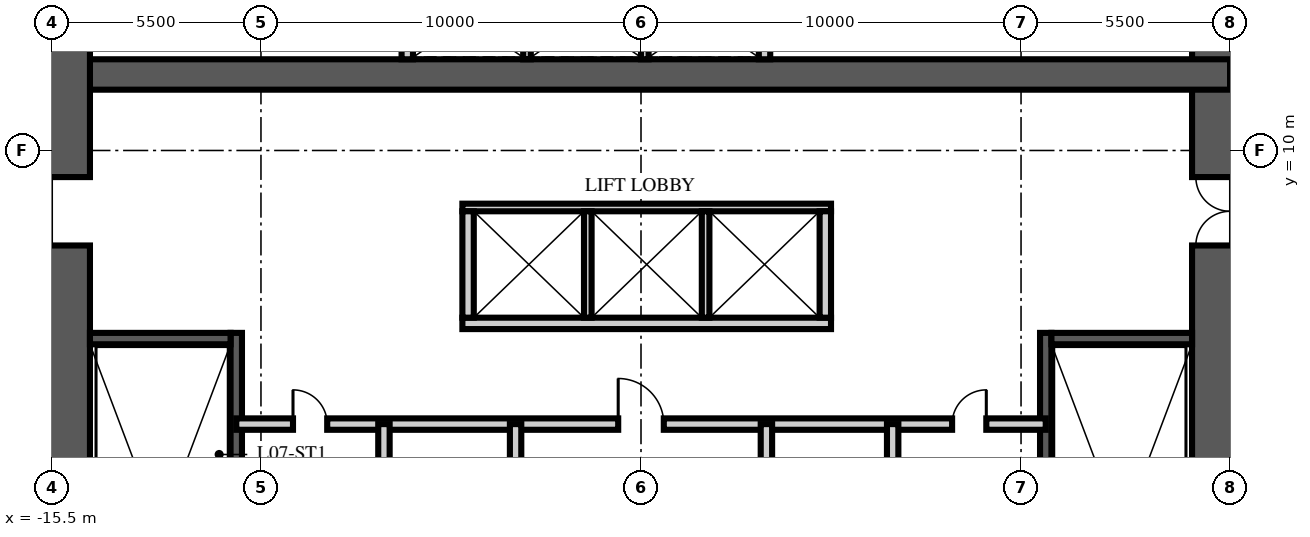
"""IFC4 building model, lengths in metres.
Left out: names, types, materials, properties, quantities, classifications, styles, units other than length and angle.
Written with IfcOpenShell. Run it as: python <this file> out.ifc"""

import sys

from ifc_helpers import new_model, si_unit, direction, frame, frame_2d, origin, place, context, subcontext, project, spatial, rectangle, extrude, element, fill, save


model = new_model("IFC4")
c1 = context("Model", 3, precision=1e-05, world=origin(), true_north=direction((0.0, 1.0)))
c2 = subcontext(c1, "Body", "Model", "MODEL_VIEW")
j1 = project(units=[si_unit("LENGTHUNIT", "METRE"), si_unit("PLANEANGLEUNIT", "RADIAN")], contexts=[c1])
p1 = place(None, origin())
s1 = spatial("IfcSite", under=j1, at=p1, CompositionType="ELEMENT")
p2 = place(p1, origin())
s2 = spatial("IfcBuilding", under=s1, at=p2, CompositionType="ELEMENT")
p3 = place(p2, frame((0.0, 0.0, 32.25)))
s3 = spatial("IfcBuildingStorey", under=s2, at=p3, CompositionType="ELEMENT", Elevation=32.25)
p4 = place(p3, frame((15.5, -15.5, -0.25), z_axis=(0.0, 0.0, 1.0), x_axis=(0.0, 1.0, 0.0)))
e1 = element("IfcWall", 1, at=p4, inside=s3, PredefinedType="SHEAR", context=c2, shape_type="SweptSolid", body=[
    extrude(rectangle(XDim=31.0, YDim=2.0, at=frame_2d((15.5, 0.0))), origin(), (0.0, 0.0, 1.0), 3.75),
])
p5 = place(p4, frame((6.5, 0.0, 0.25)))
e2 = element("IfcOpeningElement", 2, at=p5, cuts=e1, PredefinedType="OPENING", context=c2, shape_type="SweptSolid", body=[
    extrude(rectangle(XDim=1.2, YDim=2.1, at=frame_2d((0.6, 1.05))), frame((0.0, 1.01, 0.0), z_axis=(0.0, -1.0, 0.0), x_axis=(1.0, 0.0, 0.0)), (0.0, 0.0, 1.0), 2.02),
])
p6 = place(p4, frame((23.0, 0.0, 0.25)))
e3 = element("IfcOpeningElement", 3, at=p6, cuts=e1, PredefinedType="OPENING", context=c2, shape_type="SweptSolid", body=[
    extrude(rectangle(XDim=1.8, YDim=2.1, at=frame_2d((0.9, 1.05))), frame((0.0, 1.01, 0.0), z_axis=(0.0, -1.0, 0.0), x_axis=(1.0, 0.0, 0.0)), (0.0, 0.0, 1.0), 2.02),
])
p7 = place(p3, frame((-15.5, 12.0, -0.25), z_axis=(0.0, 0.0, 1.0), x_axis=(1.0, 0.0, 0.0)))
e4 = element("IfcWall", 4, at=p7, inside=s3, PredefinedType="SHEAR", context=c2, shape_type="SweptSolid", body=[
    extrude(rectangle(XDim=31.0, YDim=0.8, at=frame_2d((15.5, 0.0))), origin(), (0.0, 0.0, 1.0), 3.75),
])
p8 = place(p3, frame((-15.5, -15.5, -0.25), z_axis=(0.0, 0.0, 1.0), x_axis=(0.0, 1.0, 0.0)))
e5 = element("IfcWall", 5, at=p8, inside=s3, PredefinedType="SHEAR", context=c2, shape_type="SweptSolid", body=[
    extrude(rectangle(XDim=31.0, YDim=2.0, at=frame_2d((15.5, 0.0))), origin(), (0.0, 0.0, 1.0), 3.75),
])
p9 = place(p8, frame((6.5, 0.0, 0.25)))
e6 = element("IfcOpeningElement", 6, at=p9, cuts=e5, PredefinedType="OPENING", context=c2, shape_type="SweptSolid", body=[
    extrude(rectangle(XDim=1.2, YDim=2.1, at=frame_2d((0.6, 1.05))), frame((0.0, 1.01, 0.0), z_axis=(0.0, -1.0, 0.0), x_axis=(1.0, 0.0, 0.0)), (0.0, 0.0, 1.0), 2.02),
])
p10 = place(p8, frame((23.0, 0.0, 0.25)))
e7 = element("IfcOpeningElement", 7, at=p10, cuts=e5, PredefinedType="OPENING", context=c2, shape_type="SweptSolid", body=[
    extrude(rectangle(XDim=1.8, YDim=2.1, at=frame_2d((0.9, 1.05))), frame((0.0, 1.01, 0.0), z_axis=(0.0, -1.0, 0.0), x_axis=(1.0, 0.0, 0.0)), (0.0, 0.0, 1.0), 2.02),
])
p11 = place(p3, frame((-10.65, -4.9, 0.0), z_axis=(0.0, 0.0, 1.0), x_axis=(0.0, 1.0, 0.0)))
e8 = element("IfcWall", 8, at=p11, inside=s3, PredefinedType="SOLIDWALL", context=c2, shape_type="SweptSolid", body=[
    extrude(rectangle(XDim=10.1, YDim=0.3, at=frame_2d((5.05, 0.0))), origin(), (0.0, 0.0, 1.0), 3.5),
])
p12 = place(p3, frame((-14.5, 5.05, 0.0), z_axis=(0.0, 0.0, 1.0), x_axis=(1.0, 0.0, 0.0)))
e9 = element("IfcWall", 9, at=p12, inside=s3, PredefinedType="SOLIDWALL", context=c2, shape_type="SweptSolid", body=[
    extrude(rectangle(XDim=3.7, YDim=0.3, at=frame_2d((1.85, 0.0))), origin(), (0.0, 0.0, 1.0), 3.5),
])
p13 = place(p3, frame((10.65, -4.9, 0.0), z_axis=(0.0, 0.0, 1.0), x_axis=(0.0, 1.0, 0.0)))
e10 = element("IfcWall", 10, at=p13, inside=s3, PredefinedType="SOLIDWALL", context=c2, shape_type="SweptSolid", body=[
    extrude(rectangle(XDim=10.1, YDim=0.3, at=frame_2d((5.05, 0.0))), origin(), (0.0, 0.0, 1.0), 3.5),
])
p14 = place(p3, frame((14.5, 5.05, 0.0), z_axis=(0.0, 0.0, 1.0), x_axis=(-1.0, 0.0, 0.0)))
e11 = element("IfcWall", 11, at=p14, inside=s3, PredefinedType="SOLIDWALL", context=c2, shape_type="SweptSolid", body=[
    extrude(rectangle(XDim=3.7, YDim=0.3, at=frame_2d((1.85, 0.0))), origin(), (0.0, 0.0, 1.0), 3.5),
])
p15 = place(p3, frame((-4.7, 5.45, 0.0), z_axis=(0.0, 0.0, 1.0), x_axis=(1.0, 0.0, 0.0)))
e12 = element("IfcWall", 12, at=p15, inside=s3, PredefinedType="PARTITIONING", context=c2, shape_type="SweptSolid", body=[
    extrude(rectangle(XDim=9.7, YDim=0.3, at=frame_2d((4.85, 0.0))), origin(), (0.0, 0.0, 1.0), 3.5),
])
p16 = place(p3, frame((-4.7, 8.5, 0.0), z_axis=(0.0, 0.0, 1.0), x_axis=(1.0, 0.0, 0.0)))
e13 = element("IfcWall", 13, at=p16, inside=s3, PredefinedType="PARTITIONING", context=c2, shape_type="SweptSolid", body=[
    extrude(rectangle(XDim=9.7, YDim=0.2, at=frame_2d((4.85, 0.0))), origin(), (0.0, 0.0, 1.0), 3.5),
])
for number, where, z_axis, x_axis in (
    (14, (-4.55, 5.6, 0.0), (0.0, 0.0, 1.0), (0.0, 1.0, 0.0)),
    (15, (4.85, 5.6, 0.0), (0.0, 0.0, 1.0), (0.0, 1.0, 0.0)),
):
    element("IfcWall", number, at=place(p3, frame(where, z_axis=z_axis, x_axis=x_axis)), inside=s3, PredefinedType="PARTITIONING", context=c2, shape_type="SweptSolid", body=[
        extrude(rectangle(XDim=2.8, YDim=0.3, at=frame_2d((1.4, 0.0))), origin(), (0.0, 0.0, 1.0), 3.5),
    ])
for number, where, z_axis, x_axis in (
    (16, (-1.4, 5.6, 0.0), (0.0, 0.0, 1.0), (0.0, 1.0, 0.0)),
    (17, (1.7, 5.6, 0.0), (0.0, 0.0, 1.0), (0.0, 1.0, 0.0)),
):
    element("IfcWall", number, at=place(p3, frame(where, z_axis=z_axis, x_axis=x_axis)), inside=s3, PredefinedType="PARTITIONING", context=c2, shape_type="SweptSolid", body=[
        extrude(rectangle(XDim=2.8, YDim=0.2, at=frame_2d((1.4, 0.0))), origin(), (0.0, 0.0, 1.0), 3.5),
    ])
for number, where, z_axis, x_axis in (
    (18, (-6.15, 12.4, 0.0), (0.0, 0.0, 1.0), (0.0, 1.0, 0.0)),
    (19, (3.25, 12.4, 0.0), (0.0, 0.0, 1.0), (0.0, 1.0, 0.0)),
):
    element("IfcWall", number, at=place(p3, frame(where, z_axis=z_axis, x_axis=x_axis)), inside=s3, PredefinedType="PARTITIONING", context=c2, shape_type="SweptSolid", body=[
        extrude(rectangle(XDim=2.1, YDim=0.3, at=frame_2d((1.05, 0.0))), origin(), (0.0, 0.0, 1.0), 3.5),
    ])
for number, where, z_axis, x_axis in (
    (20, (-3.0, 12.4, 0.0), (0.0, 0.0, 1.0), (0.0, 1.0, 0.0)),
    (21, (0.1, 12.4, 0.0), (0.0, 0.0, 1.0), (0.0, 1.0, 0.0)),
):
    element("IfcWall", number, at=place(p3, frame(where, z_axis=z_axis, x_axis=x_axis)), inside=s3, PredefinedType="PARTITIONING", context=c2, shape_type="SweptSolid", body=[
        extrude(rectangle(XDim=2.1, YDim=0.2, at=frame_2d((1.05, 0.0))), origin(), (0.0, 0.0, 1.0), 3.5),
    ])
p17 = place(p3, frame((-10.65, 2.8, 0.0), z_axis=(0.0, 0.0, 1.0), x_axis=(1.0, 0.0, 0.0)))
e22 = element("IfcWall", 22, at=p17, inside=s3, PredefinedType="PARTITIONING", context=c2, shape_type="SweptSolid", body=[
    extrude(rectangle(XDim=21.3, YDim=0.3, at=frame_2d((10.65, 0.0))), origin(), (0.0, 0.0, 1.0), 3.5),
])
p18 = place(p17, frame((10.05, 0.0, 0.0)))
e23 = element("IfcOpeningElement", 23, at=p18, cuts=e22, PredefinedType="OPENING", context=c2, shape_type="SweptSolid", body=[
    extrude(rectangle(XDim=1.2, YDim=2.1, at=frame_2d((0.6, 1.05))), frame((0.0, 0.16, 0.0), z_axis=(0.0, -1.0, 0.0), x_axis=(1.0, 0.0, 0.0)), (0.0, 0.0, 1.0), 0.32),
])
p19 = place(p17, frame((1.493, 0.0, 0.0)))
e24 = element("IfcOpeningElement", 24, at=p19, cuts=e22, PredefinedType="OPENING", context=c2, shape_type="SweptSolid", body=[
    extrude(rectangle(XDim=0.9, YDim=2.1, at=frame_2d((0.45, 1.05))), frame((0.0, 0.16, 0.0), z_axis=(0.0, -1.0, 0.0), x_axis=(1.0, 0.0, 0.0)), (0.0, 0.0, 1.0), 0.32),
])
p20 = place(p17, frame((18.836, 0.0, 0.0)))
e25 = element("IfcOpeningElement", 25, at=p20, cuts=e22, PredefinedType="OPENING", context=c2, shape_type="SweptSolid", body=[
    extrude(rectangle(XDim=0.9, YDim=2.1, at=frame_2d((0.45, 1.05))), frame((0.0, 0.16, 0.0), z_axis=(0.0, -1.0, 0.0), x_axis=(1.0, 0.0, 0.0)), (0.0, 0.0, 1.0), 0.32),
])
p21 = place(p3, frame((-3.3, -6.65, 0.0), z_axis=(0.0, 0.0, 1.0), x_axis=(0.0, 1.0, 0.0)))
e26 = element("IfcWall", 26, at=p21, inside=s3, PredefinedType="PARTITIONING", context=c2, shape_type="SweptSolid", body=[
    extrude(rectangle(XDim=9.45, YDim=0.3, at=frame_2d((4.725, 0.0))), origin(), (0.0, 0.0, 1.0), 3.5),
])
p22 = place(p21, frame((4.275, 0.0, 0.0)))
e27 = element("IfcOpeningElement", 27, at=p22, cuts=e26, PredefinedType="OPENING", context=c2, shape_type="SweptSolid", body=[
    extrude(rectangle(XDim=0.9, YDim=2.1, at=frame_2d((0.45, 1.05))), frame((0.0, 0.16, 0.0), z_axis=(0.0, -1.0, 0.0), x_axis=(1.0, 0.0, 0.0)), (0.0, 0.0, 1.0), 0.32),
])
p23 = place(p3, frame((3.3, -6.65, 0.0), z_axis=(0.0, 0.0, 1.0), x_axis=(0.0, 1.0, 0.0)))
e28 = element("IfcWall", 28, at=p23, inside=s3, PredefinedType="PARTITIONING", context=c2, shape_type="SweptSolid", body=[
    extrude(rectangle(XDim=9.45, YDim=0.3, at=frame_2d((4.725, 0.0))), origin(), (0.0, 0.0, 1.0), 3.5),
])
p24 = place(p23, frame((4.275, 0.0, 0.0)))
e29 = element("IfcOpeningElement", 29, at=p24, cuts=e28, PredefinedType="OPENING", context=c2, shape_type="SweptSolid", body=[
    extrude(rectangle(XDim=0.9, YDim=2.1, at=frame_2d((0.45, 1.05))), frame((0.0, 0.16, 0.0), z_axis=(0.0, -1.0, 0.0), x_axis=(1.0, 0.0, 0.0)), (0.0, 0.0, 1.0), 0.32),
])
for number, where, z_axis, x_axis in (
    (30, (-6.764, -6.65, 0.0), (0.0, 0.0, 1.0), (0.0, 1.0, 0.0)),
    (31, (6.622, -6.65, 0.0), (0.0, 0.0, 1.0), (0.0, 1.0, 0.0)),
):
    element("IfcWall", number, at=place(p3, frame(where, z_axis=z_axis, x_axis=x_axis)), inside=s3, PredefinedType="PARTITIONING", context=c2, shape_type="SweptSolid", body=[
        extrude(rectangle(XDim=9.45, YDim=0.3, at=frame_2d((4.725, 0.0))), origin(), (0.0, 0.0, 1.0), 3.5),
    ])
p25 = place(p10, origin())
e32 = element("IfcDoor", 32, at=p25, inside=s3, OperationType="DOUBLE_DOOR_SINGLE_SWING", PredefinedType="DOOR", context=c2, shape_type="SweptSolid", body=[
    extrude(rectangle(XDim=1.8, YDim=2.1, at=frame_2d((0.9, 1.05))), frame((0.0, 0.025, 0.0), z_axis=(0.0, -1.0, 0.0), x_axis=(1.0, 0.0, 0.0)), (0.0, 0.0, 1.0), 0.05),
])
fill(e7, e32)
p26 = place(p6, origin())
e33 = element("IfcDoor", 33, at=p26, inside=s3, OperationType="DOUBLE_DOOR_SINGLE_SWING", PredefinedType="DOOR", context=c2, shape_type="SweptSolid", body=[
    extrude(rectangle(XDim=1.8, YDim=2.1, at=frame_2d((0.9, 1.05))), frame((0.0, 0.025, 0.0), z_axis=(0.0, -1.0, 0.0), x_axis=(1.0, 0.0, 0.0)), (0.0, 0.0, 1.0), 0.05),
])
fill(e3, e33)
p27 = place(p18, origin())
e34 = element("IfcDoor", 34, at=p27, inside=s3, OperationType="SINGLE_SWING_LEFT", PredefinedType="DOOR", context=c2, shape_type="SweptSolid", body=[
    extrude(rectangle(XDim=1.2, YDim=2.1, at=frame_2d((0.6, 1.05))), frame((0.0, 0.025, 0.0), z_axis=(0.0, -1.0, 0.0), x_axis=(1.0, 0.0, 0.0)), (0.0, 0.0, 1.0), 0.05),
])
fill(e23, e34)
p28 = place(p19, origin())
e35 = element("IfcDoor", 35, at=p28, inside=s3, OperationType="SINGLE_SWING_LEFT", PredefinedType="DOOR", context=c2, shape_type="SweptSolid", body=[
    extrude(rectangle(XDim=0.9, YDim=2.1, at=frame_2d((0.45, 1.05))), frame((0.0, 0.025, 0.0), z_axis=(0.0, -1.0, 0.0), x_axis=(1.0, 0.0, 0.0)), (0.0, 0.0, 1.0), 0.05),
])
fill(e24, e35)
p29 = place(p20, origin())
e36 = element("IfcDoor", 36, at=p29, inside=s3, OperationType="SINGLE_SWING_RIGHT", PredefinedType="DOOR", context=c2, shape_type="SweptSolid", body=[
    extrude(rectangle(XDim=0.9, YDim=2.1, at=frame_2d((0.45, 1.05))), frame((0.0, 0.025, 0.0), z_axis=(0.0, -1.0, 0.0), x_axis=(1.0, 0.0, 0.0)), (0.0, 0.0, 1.0), 0.05),
])
fill(e25, e36)
save(model, sys.argv[1])
